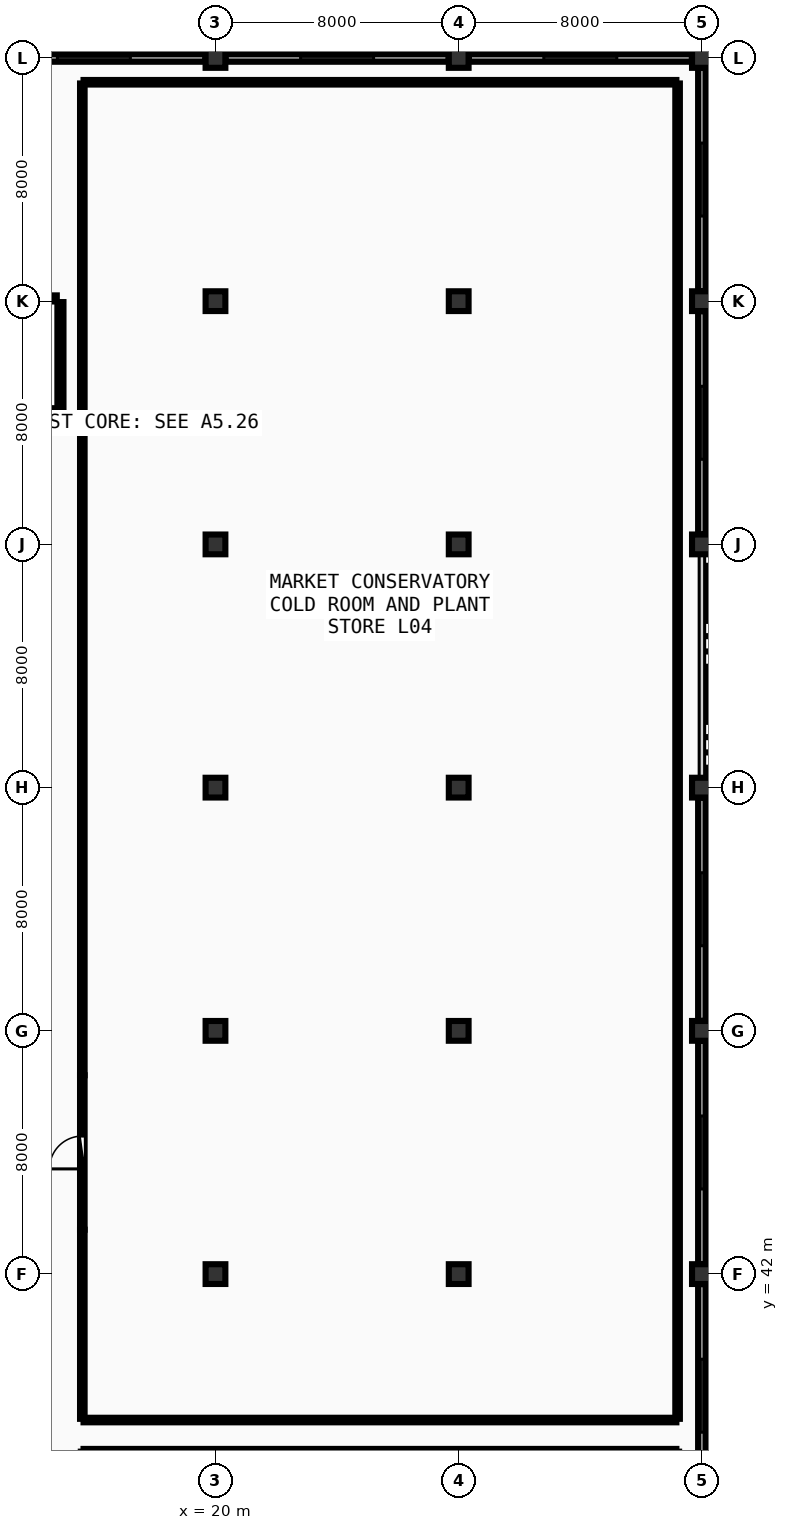
"""IFC4 building model, lengths in metres.
Left out: names, types, materials, properties, quantities, classifications, styles, units other than length and angle.
Written with IfcOpenShell. Run it as: python <this file> out.ifc"""

import sys

from ifc_helpers import new_model, si_unit, direction, frame, frame_2d, origin, origin_2d, place, context, subcontext, project, spatial, rectangle, extrude, element, fill, save


model = new_model("IFC4")
c1 = context("Model", 3, precision=1e-05, world=origin(), true_north=direction((0.0, 1.0)))
c2 = subcontext(c1, "Body", "Model", "MODEL_VIEW")
j1 = project(units=[si_unit("LENGTHUNIT", "METRE"), si_unit("PLANEANGLEUNIT", "RADIAN")], contexts=[c1])
p1 = place(None, origin())
s1 = spatial("IfcSite", under=j1, at=p1, CompositionType="ELEMENT")
p2 = place(p1, origin())
s2 = spatial("IfcBuilding", under=s1, at=p2, CompositionType="ELEMENT")
p3 = place(p2, frame((0.0, 0.0, 18.0)))
s3 = spatial("IfcBuildingStorey", under=s2, at=p3, CompositionType="ELEMENT", Elevation=18.0)
for number, where, z_axis, x_axis in (
    (1, (20.0, 42.0, 0.0), (0.0, 0.0, 1.0), (1.0, 0.0, 0.0)),
    (2, (20.0, 50.0, 0.0), (0.0, 0.0, 1.0), (1.0, 0.0, 0.0)),
    (3, (20.0, 58.0, 0.0), (0.0, 0.0, 1.0), (1.0, 0.0, 0.0)),
    (4, (20.0, 66.0, 0.0), (0.0, 0.0, 1.0), (1.0, 0.0, 0.0)),
    (5, (20.0, 74.0, 0.0), (0.0, 0.0, 1.0), (1.0, 0.0, 0.0)),
    (6, (20.0, 82.0, 0.0), (0.0, 0.0, 1.0), (1.0, 0.0, 0.0)),
    (7, (28.0, 42.0, 0.0), (0.0, 0.0, 1.0), (1.0, 0.0, 0.0)),
    (8, (28.0, 50.0, 0.0), (0.0, 0.0, 1.0), (1.0, 0.0, 0.0)),
    (9, (28.0, 58.0, 0.0), (0.0, 0.0, 1.0), (1.0, 0.0, 0.0)),
    (10, (28.0, 66.0, 0.0), (0.0, 0.0, 1.0), (1.0, 0.0, 0.0)),
    (11, (28.0, 74.0, 0.0), (0.0, 0.0, 1.0), (1.0, 0.0, 0.0)),
    (12, (28.0, 82.0, 0.0), (0.0, 0.0, 1.0), (1.0, 0.0, 0.0)),
    (13, (36.0, 42.0, 0.0), (0.0, 0.0, 1.0), (1.0, 0.0, 0.0)),
    (14, (36.0, 50.0, 0.0), (0.0, 0.0, 1.0), (1.0, 0.0, 0.0)),
    (15, (36.0, 58.0, 0.0), (0.0, 0.0, 1.0), (1.0, 0.0, 0.0)),
    (16, (36.0, 66.0, 0.0), (0.0, 0.0, 1.0), (1.0, 0.0, 0.0)),
    (17, (36.0, 74.0, 0.0), (0.0, 0.0, 1.0), (1.0, 0.0, 0.0)),
    (18, (36.0, 82.0, 0.0), (0.0, 0.0, 1.0), (1.0, 0.0, 0.0)),
):
    element("IfcColumn", number, at=place(p3, frame(where, z_axis=z_axis, x_axis=x_axis)), inside=s3, PredefinedType="COLUMN", context=c2, shape_type="SweptSolid", body=[
        extrude(rectangle(XDim=0.65, YDim=0.65, at=origin_2d()), origin(), (0.0, 0.0, 1.0), 4.5),
    ])
p4 = place(p3, frame((36.0, 34.33, 0.0), z_axis=(0.0, 0.0, 1.0), x_axis=(0.0, 1.0, 0.0)))
e19 = element("IfcWall", 19, at=p4, inside=s3, PredefinedType="SOLIDWALL", context=c2, shape_type="SweptSolid", body=[
    extrude(rectangle(XDim=7.34, YDim=0.25, at=frame_2d((3.67, 0.0))), origin(), (0.0, 0.0, 1.0), 3.44),
])
p5 = place(p4, frame((2.47, 0.0, 0.95)))
e20 = element("IfcOpeningElement", 20, at=p5, cuts=e19, PredefinedType="OPENING", context=c2, shape_type="SweptSolid", body=[
    extrude(rectangle(XDim=2.4, YDim=1.65, at=frame_2d((1.2, 0.825))), frame((0.0, 0.135, 0.0), z_axis=(0.0, -1.0, 0.0), x_axis=(1.0, 0.0, 0.0)), (0.0, 0.0, 1.0), 0.27),
])
p6 = place(p3, frame((36.0, 42.33, 0.0), z_axis=(0.0, 0.0, 1.0), x_axis=(0.0, 1.0, 0.0)))
e21 = element("IfcWall", 21, at=p6, inside=s3, PredefinedType="SOLIDWALL", context=c2, shape_type="SweptSolid", body=[
    extrude(rectangle(XDim=7.34, YDim=0.25, at=frame_2d((3.67, 0.0))), origin(), (0.0, 0.0, 1.0), 3.44),
])
p7 = place(p6, frame((2.47, 0.0, 0.95)))
e22 = element("IfcOpeningElement", 22, at=p7, cuts=e21, PredefinedType="OPENING", context=c2, shape_type="SweptSolid", body=[
    extrude(rectangle(XDim=2.4, YDim=1.65, at=frame_2d((1.2, 0.825))), frame((0.0, 0.135, 0.0), z_axis=(0.0, -1.0, 0.0), x_axis=(1.0, 0.0, 0.0)), (0.0, 0.0, 1.0), 0.27),
])
p8 = place(p3, frame((36.0, 50.33, 0.0), z_axis=(0.0, 0.0, 1.0), x_axis=(0.0, 1.0, 0.0)))
e23 = element("IfcWall", 23, at=p8, inside=s3, PredefinedType="SOLIDWALL", context=c2, shape_type="SweptSolid", body=[
    extrude(rectangle(XDim=7.34, YDim=0.25, at=frame_2d((3.67, 0.0))), origin(), (0.0, 0.0, 1.0), 3.44),
])
p9 = place(p8, frame((2.47, 0.0, 0.95)))
e24 = element("IfcOpeningElement", 24, at=p9, cuts=e23, PredefinedType="OPENING", context=c2, shape_type="SweptSolid", body=[
    extrude(rectangle(XDim=2.4, YDim=1.65, at=frame_2d((1.2, 0.825))), frame((0.0, 0.135, 0.0), z_axis=(0.0, -1.0, 0.0), x_axis=(1.0, 0.0, 0.0)), (0.0, 0.0, 1.0), 0.27),
])
p10 = place(p3, frame((36.0, 66.33, 0.0), z_axis=(0.0, 0.0, 1.0), x_axis=(0.0, 1.0, 0.0)))
e25 = element("IfcWall", 25, at=p10, inside=s3, PredefinedType="SOLIDWALL", context=c2, shape_type="SweptSolid", body=[
    extrude(rectangle(XDim=7.34, YDim=0.25, at=frame_2d((3.67, 0.0))), origin(), (0.0, 0.0, 1.0), 3.44),
])
p11 = place(p10, frame((2.47, 0.0, 0.95)))
e26 = element("IfcOpeningElement", 26, at=p11, cuts=e25, PredefinedType="OPENING", context=c2, shape_type="SweptSolid", body=[
    extrude(rectangle(XDim=2.4, YDim=1.65, at=frame_2d((1.2, 0.825))), frame((0.0, 0.135, 0.0), z_axis=(0.0, -1.0, 0.0), x_axis=(1.0, 0.0, 0.0)), (0.0, 0.0, 1.0), 0.27),
])
p12 = place(p3, frame((36.0, 74.33, 0.0), z_axis=(0.0, 0.0, 1.0), x_axis=(0.0, 1.0, 0.0)))
e27 = element("IfcWall", 27, at=p12, inside=s3, PredefinedType="SOLIDWALL", context=c2, shape_type="SweptSolid", body=[
    extrude(rectangle(XDim=7.34, YDim=0.25, at=frame_2d((3.67, 0.0))), origin(), (0.0, 0.0, 1.0), 3.44),
])
p13 = place(p12, frame((2.47, 0.0, 0.95)))
e28 = element("IfcOpeningElement", 28, at=p13, cuts=e27, PredefinedType="OPENING", context=c2, shape_type="SweptSolid", body=[
    extrude(rectangle(XDim=2.4, YDim=1.65, at=frame_2d((1.2, 0.825))), frame((0.0, 0.135, 0.0), z_axis=(0.0, -1.0, 0.0), x_axis=(1.0, 0.0, 0.0)), (0.0, 0.0, 1.0), 0.27),
])
p14 = place(p3, frame((35.67, 82.0, 0.0), z_axis=(0.0, 0.0, 1.0), x_axis=(-1.0, 0.0, 0.0)))
e29 = element("IfcWall", 29, at=p14, inside=s3, PredefinedType="SOLIDWALL", context=c2, shape_type="SweptSolid", body=[
    extrude(rectangle(XDim=7.34, YDim=0.25, at=frame_2d((3.67, 0.0))), origin(), (0.0, 0.0, 1.0), 3.44),
])
p15 = place(p14, frame((2.47, 0.0, 0.95)))
e30 = element("IfcOpeningElement", 30, at=p15, cuts=e29, PredefinedType="OPENING", context=c2, shape_type="SweptSolid", body=[
    extrude(rectangle(XDim=2.4, YDim=1.65, at=frame_2d((1.2, 0.825))), frame((0.0, 0.135, 0.0), z_axis=(0.0, -1.0, 0.0), x_axis=(1.0, 0.0, 0.0)), (0.0, 0.0, 1.0), 0.27),
])
p16 = place(p3, frame((27.67, 82.0, 0.0), z_axis=(0.0, 0.0, 1.0), x_axis=(-1.0, 0.0, 0.0)))
e31 = element("IfcWall", 31, at=p16, inside=s3, PredefinedType="SOLIDWALL", context=c2, shape_type="SweptSolid", body=[
    extrude(rectangle(XDim=7.34, YDim=0.25, at=frame_2d((3.67, 0.0))), origin(), (0.0, 0.0, 1.0), 3.44),
])
p17 = place(p16, frame((2.47, 0.0, 0.95)))
e32 = element("IfcOpeningElement", 32, at=p17, cuts=e31, PredefinedType="OPENING", context=c2, shape_type="SweptSolid", body=[
    extrude(rectangle(XDim=2.4, YDim=1.65, at=frame_2d((1.2, 0.825))), frame((0.0, 0.135, 0.0), z_axis=(0.0, -1.0, 0.0), x_axis=(1.0, 0.0, 0.0)), (0.0, 0.0, 1.0), 0.27),
])
p18 = place(p3, frame((19.67, 82.0, 0.0), z_axis=(0.0, 0.0, 1.0), x_axis=(-1.0, 0.0, 0.0)))
e33 = element("IfcWall", 33, at=p18, inside=s3, PredefinedType="SOLIDWALL", context=c2, shape_type="SweptSolid", body=[
    extrude(rectangle(XDim=7.34, YDim=0.25, at=frame_2d((3.67, 0.0))), origin(), (0.0, 0.0, 1.0), 3.44),
])
p19 = place(p18, frame((2.47, 0.0, 0.95)))
e34 = element("IfcOpeningElement", 34, at=p19, cuts=e33, PredefinedType="OPENING", context=c2, shape_type="SweptSolid", body=[
    extrude(rectangle(XDim=2.4, YDim=1.65, at=frame_2d((1.2, 0.825))), frame((0.0, 0.135, 0.0), z_axis=(0.0, -1.0, 0.0), x_axis=(1.0, 0.0, 0.0)), (0.0, 0.0, 1.0), 0.27),
])
p20 = place(p3, frame((7.02, 70.38, 0.0), z_axis=(0.0, 0.0, 1.0), x_axis=(1.0, 0.0, 0.0)))
e35 = element("IfcWall", 35, at=p20, inside=s3, PredefinedType="SHEAR", context=c2, shape_type="SweptSolid", body=[
    extrude(rectangle(XDim=7.76, YDim=0.2, at=frame_2d((3.88, 0.0))), origin(), (0.0, 0.0, 1.0), 4.26),
])
p21 = place(p20, frame((0.2, 0.0, 0.0)))
e36 = element("IfcOpeningElement", 36, at=p21, cuts=e35, PredefinedType="OPENING", context=c2, shape_type="SweptSolid", body=[
    extrude(rectangle(XDim=1.05, YDim=2.1, at=frame_2d((0.525, 1.05))), frame((0.0, 0.11, 0.0), z_axis=(0.0, -1.0, 0.0), x_axis=(1.0, 0.0, 0.0)), (0.0, 0.0, 1.0), 0.22),
])
p22 = place(p3, frame((14.9, 70.5, 0.0), z_axis=(0.0, 0.0, 1.0), x_axis=(0.0, 1.0, 0.0)))
e37 = element("IfcWall", 37, at=p22, inside=s3, PredefinedType="SHEAR", context=c2, shape_type="SweptSolid", body=[
    extrude(rectangle(XDim=3.47, YDim=0.2, at=frame_2d((1.735, 0.0))), origin(), (0.0, 0.0, 1.0), 4.26),
])
p23 = place(p3, frame((14.78, 74.09, 0.0), z_axis=(0.0, 0.0, 1.0), x_axis=(-1.0, 0.0, 0.0)))
e38 = element("IfcWall", 38, at=p23, inside=s3, PredefinedType="SHEAR", context=c2, shape_type="SweptSolid", body=[
    extrude(rectangle(XDim=7.76, YDim=0.2, at=frame_2d((3.88, 0.0))), origin(), (0.0, 0.0, 1.0), 4.26),
])
p24 = place(p3, frame((15.62, 43.46, 0.0), z_axis=(0.0, 0.0, 1.0), x_axis=(0.0, 1.0, 0.0)))
e39 = element("IfcWall", 39, at=p24, inside=s3, PredefinedType="PARTITIONING", context=c2, shape_type="SweptSolid", body=[
    extrude(rectangle(XDim=5.08, YDim=0.15, at=frame_2d((2.54, 0.0))), origin(), (0.0, 0.0, 1.0), 4.23),
])
p25 = place(p24, frame((2.0, 0.0, 0.0)))
e40 = element("IfcOpeningElement", 40, at=p25, cuts=e39, PredefinedType="OPENING", context=c2, shape_type="SweptSolid", body=[
    extrude(rectangle(XDim=1.08, YDim=2.1, at=frame_2d((0.54, 1.05))), frame((0.0, 0.085, 0.0), z_axis=(0.0, -1.0, 0.0), x_axis=(1.0, 0.0, 0.0)), (0.0, 0.0, 1.0), 0.17),
])
p26 = place(p3, frame((35.16, 36.2, 0.0), z_axis=(0.0, 0.0, 1.0), x_axis=(-1.0, 0.0, 0.0)))
e41 = element("IfcWall", 41, at=p26, inside=s3, PredefinedType="PARTITIONING", context=c2, shape_type="SweptSolid", body=[
    extrude(rectangle(XDim=19.5, YDim=0.1, at=frame_2d((9.75, 0.0))), origin(), (0.0, 0.0, 1.0), 3.445),
])
p27 = place(p3, frame((15.66, 37.2, 0.0), z_axis=(0.0, 0.0, 1.0), x_axis=(1.0, 0.0, 0.0)))
e42 = element("IfcWall", 42, at=p27, inside=s3, PredefinedType="PARTITIONING", context=c2, shape_type="SweptSolid", body=[
    extrude(rectangle(XDim=19.5, YDim=0.15, at=frame_2d((9.75, 0.0))), origin(), (0.0, 0.0, 1.0), 3.445),
])
p28 = place(p3, frame((35.2, 37.24, 0.0), z_axis=(0.0, 0.0, 1.0), x_axis=(0.0, 1.0, 0.0)))
e43 = element("IfcWall", 43, at=p28, inside=s3, PredefinedType="PARTITIONING", context=c2, shape_type="SweptSolid", body=[
    extrude(rectangle(XDim=43.92, YDim=0.15, at=frame_2d((21.96, 0.0))), origin(), (0.0, 0.0, 1.0), 3.445),
])
p29 = place(p3, frame((35.16, 81.2, 0.0), z_axis=(0.0, 0.0, 1.0), x_axis=(-1.0, 0.0, 0.0)))
e44 = element("IfcWall", 44, at=p29, inside=s3, PredefinedType="PARTITIONING", context=c2, shape_type="SweptSolid", body=[
    extrude(rectangle(XDim=19.5, YDim=0.15, at=frame_2d((9.75, 0.0))), origin(), (0.0, 0.0, 1.0), 3.445),
])
p30 = place(p3, frame((15.62, 81.16, 0.0), z_axis=(0.0, 0.0, 1.0), x_axis=(0.0, -1.0, 0.0)))
e45 = element("IfcWall", 45, at=p30, inside=s3, PredefinedType="PARTITIONING", context=c2, shape_type="SweptSolid", body=[
    extrude(rectangle(XDim=32.62, YDim=0.15, at=frame_2d((16.31, 0.0))), origin(), (0.0, 0.0, 1.0), 3.445),
])
p31 = place(p3, frame((15.62, 43.46, 0.0), z_axis=(0.0, 0.0, 1.0), x_axis=(0.0, -1.0, 0.0)))
e46 = element("IfcWall", 46, at=p31, inside=s3, PredefinedType="PARTITIONING", context=c2, shape_type="SweptSolid", body=[
    extrude(rectangle(XDim=6.22, YDim=0.15, at=frame_2d((3.11, 0.0))), origin(), (0.0, 0.0, 1.0), 3.445),
])
p32 = place(p5, origin())
e47 = element("IfcWindow", 47, at=p32, inside=s3, PartitioningType="SINGLE_PANEL", PredefinedType="WINDOW", context=c2, shape_type="SweptSolid", body=[
    extrude(rectangle(XDim=2.4, YDim=1.65, at=frame_2d((1.2, 0.825))), frame((0.0, 0.03, 0.0), z_axis=(0.0, -1.0, 0.0), x_axis=(1.0, 0.0, 0.0)), (0.0, 0.0, 1.0), 0.06),
])
fill(e20, e47)
p33 = place(p7, origin())
e48 = element("IfcWindow", 48, at=p33, inside=s3, PartitioningType="SINGLE_PANEL", PredefinedType="WINDOW", context=c2, shape_type="SweptSolid", body=[
    extrude(rectangle(XDim=2.4, YDim=1.65, at=frame_2d((1.2, 0.825))), frame((0.0, 0.03, 0.0), z_axis=(0.0, -1.0, 0.0), x_axis=(1.0, 0.0, 0.0)), (0.0, 0.0, 1.0), 0.06),
])
fill(e22, e48)
p34 = place(p9, origin())
e49 = element("IfcWindow", 49, at=p34, inside=s3, PartitioningType="SINGLE_PANEL", PredefinedType="WINDOW", context=c2, shape_type="SweptSolid", body=[
    extrude(rectangle(XDim=2.4, YDim=1.65, at=frame_2d((1.2, 0.825))), frame((0.0, 0.03, 0.0), z_axis=(0.0, -1.0, 0.0), x_axis=(1.0, 0.0, 0.0)), (0.0, 0.0, 1.0), 0.06),
])
fill(e24, e49)
p35 = place(p11, origin())
e50 = element("IfcWindow", 50, at=p35, inside=s3, PartitioningType="SINGLE_PANEL", PredefinedType="WINDOW", context=c2, shape_type="SweptSolid", body=[
    extrude(rectangle(XDim=2.4, YDim=1.65, at=frame_2d((1.2, 0.825))), frame((0.0, 0.03, 0.0), z_axis=(0.0, -1.0, 0.0), x_axis=(1.0, 0.0, 0.0)), (0.0, 0.0, 1.0), 0.06),
])
fill(e26, e50)
p36 = place(p13, origin())
e51 = element("IfcWindow", 51, at=p36, inside=s3, PartitioningType="SINGLE_PANEL", PredefinedType="WINDOW", context=c2, shape_type="SweptSolid", body=[
    extrude(rectangle(XDim=2.4, YDim=1.65, at=frame_2d((1.2, 0.825))), frame((0.0, 0.03, 0.0), z_axis=(0.0, -1.0, 0.0), x_axis=(1.0, 0.0, 0.0)), (0.0, 0.0, 1.0), 0.06),
])
fill(e28, e51)
p37 = place(p15, origin())
e52 = element("IfcWindow", 52, at=p37, inside=s3, PartitioningType="SINGLE_PANEL", PredefinedType="WINDOW", context=c2, shape_type="SweptSolid", body=[
    extrude(rectangle(XDim=2.4, YDim=1.65, at=frame_2d((1.2, 0.825))), frame((0.0, 0.03, 0.0), z_axis=(0.0, -1.0, 0.0), x_axis=(1.0, 0.0, 0.0)), (0.0, 0.0, 1.0), 0.06),
])
fill(e30, e52)
p38 = place(p17, origin())
e53 = element("IfcWindow", 53, at=p38, inside=s3, PartitioningType="SINGLE_PANEL", PredefinedType="WINDOW", context=c2, shape_type="SweptSolid", body=[
    extrude(rectangle(XDim=2.4, YDim=1.65, at=frame_2d((1.2, 0.825))), frame((0.0, 0.03, 0.0), z_axis=(0.0, -1.0, 0.0), x_axis=(1.0, 0.0, 0.0)), (0.0, 0.0, 1.0), 0.06),
])
fill(e32, e53)
p39 = place(p19, origin())
e54 = element("IfcWindow", 54, at=p39, inside=s3, PartitioningType="SINGLE_PANEL", PredefinedType="WINDOW", context=c2, shape_type="SweptSolid", body=[
    extrude(rectangle(XDim=2.4, YDim=1.65, at=frame_2d((1.2, 0.825))), frame((0.0, 0.03, 0.0), z_axis=(0.0, -1.0, 0.0), x_axis=(1.0, 0.0, 0.0)), (0.0, 0.0, 1.0), 0.06),
])
fill(e34, e54)
p40 = place(p25, origin())
e55 = element("IfcDoor", 55, at=p40, inside=s3, OperationType="SINGLE_SWING_LEFT", PredefinedType="DOOR", context=c2, shape_type="SweptSolid", body=[
    extrude(rectangle(XDim=1.08, YDim=2.1, at=frame_2d((0.54, 1.05))), frame((0.0, 0.025, 0.0), z_axis=(0.0, -1.0, 0.0), x_axis=(1.0, 0.0, 0.0)), (0.0, 0.0, 1.0), 0.05),
])
fill(e40, e55)
save(model, sys.argv[1])
